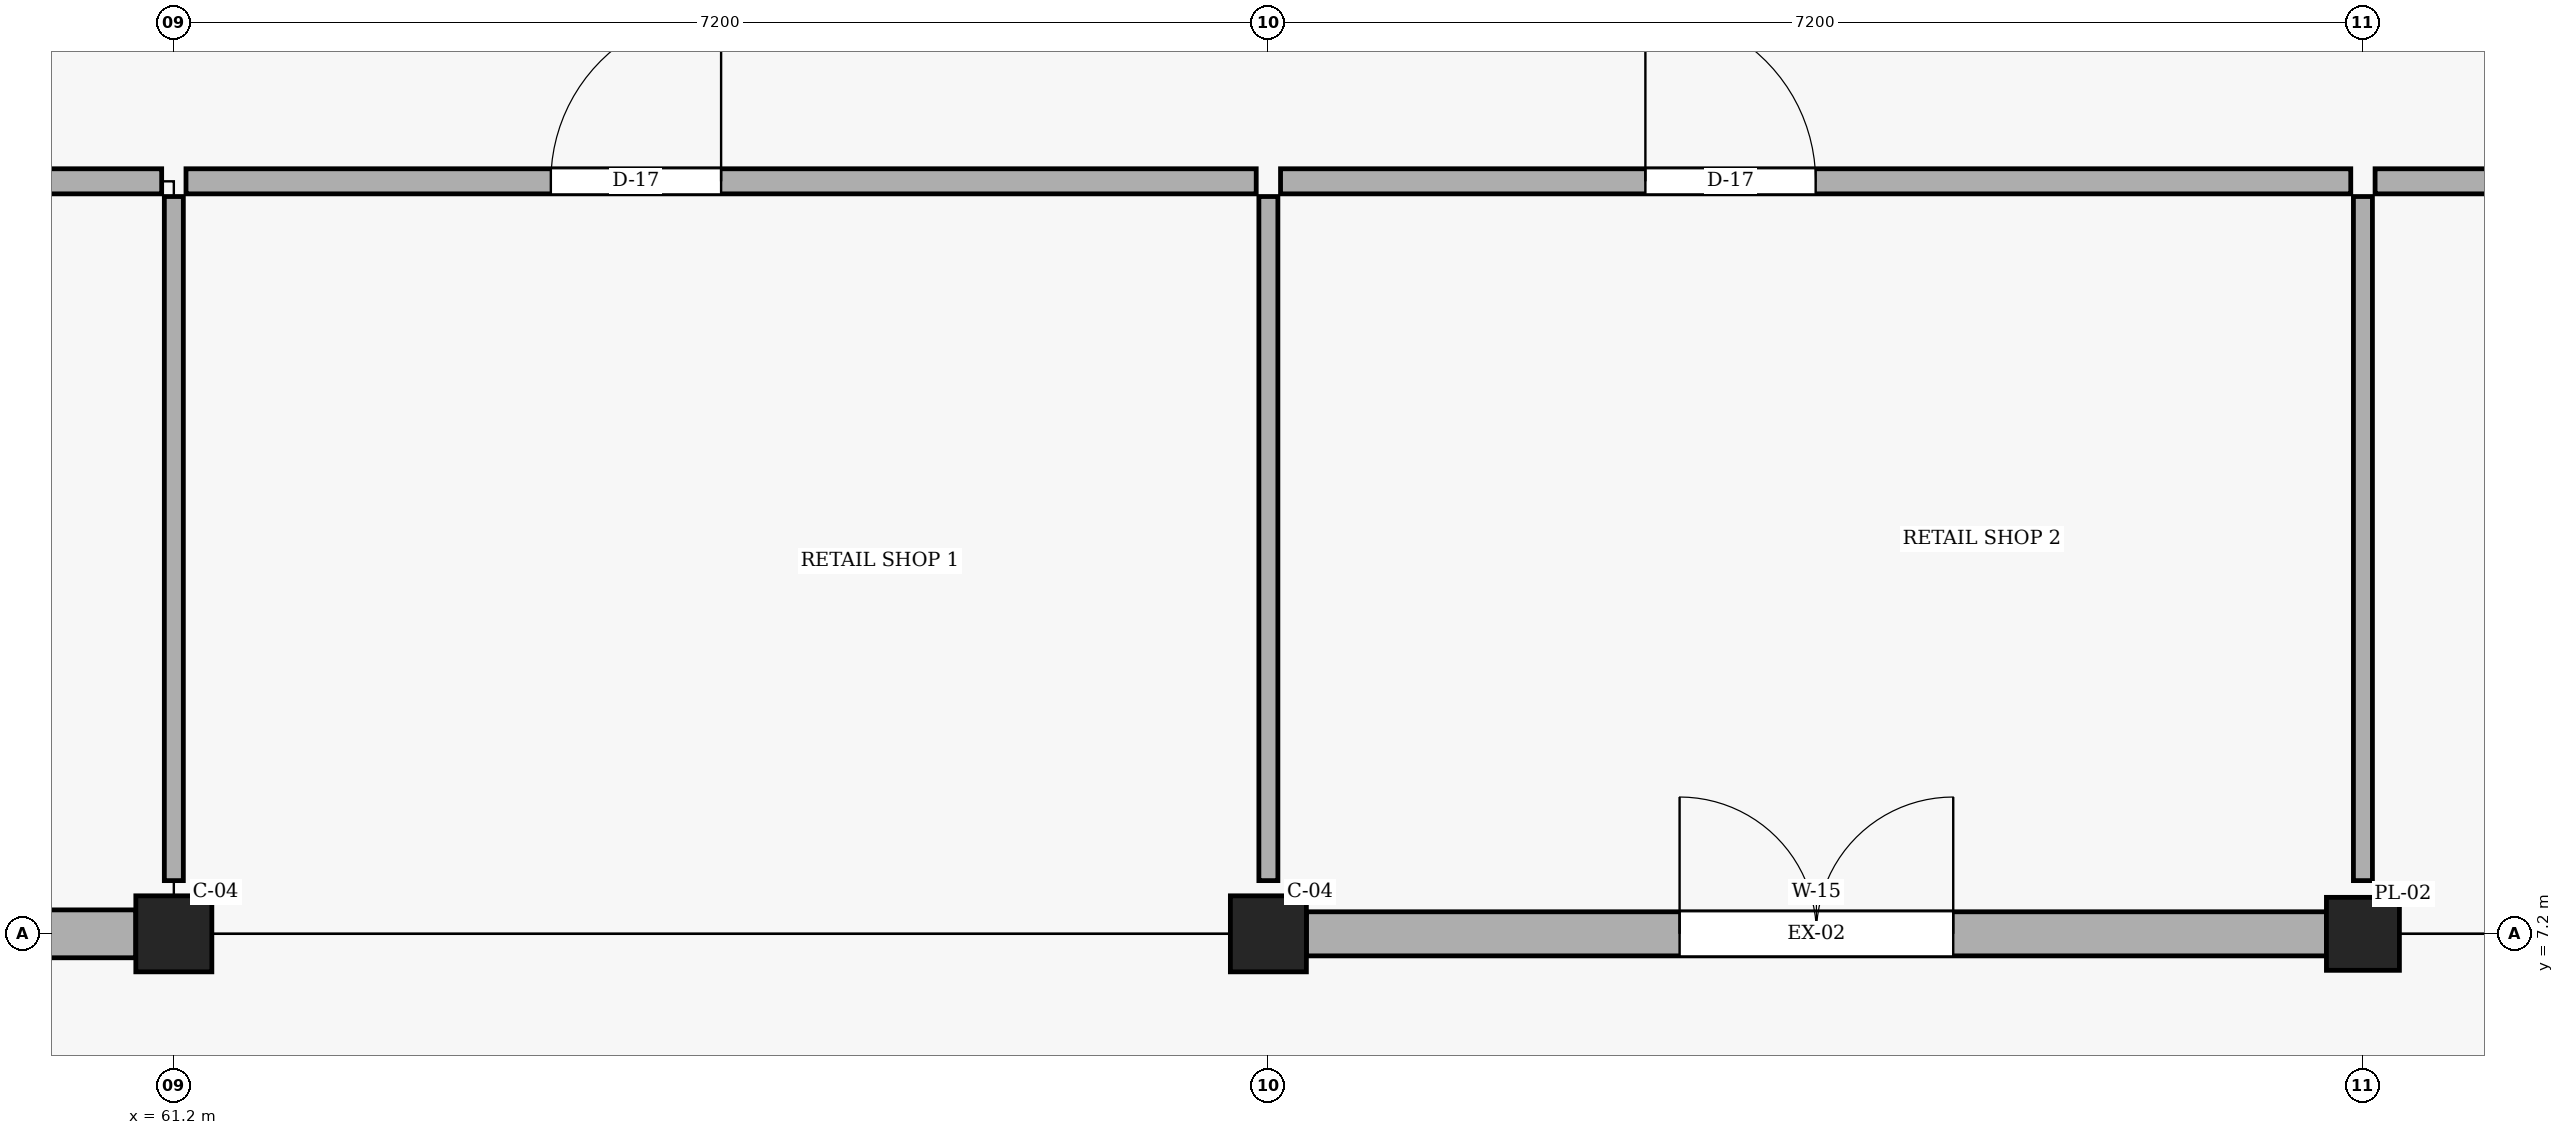
"""IFC4 building model, lengths in metres.
Left out: names, types, materials, properties, quantities, classifications, styles, units other than length and angle.
Written with IfcOpenShell. Run it as: python <this file> out.ifc"""

import sys

from ifc_helpers import new_model, si_unit, direction, frame, frame_2d, origin, origin_2d, place, context, subcontext, project, spatial, rectangle, extrude, element, fill, save


model = new_model("IFC4")
c1 = context("Model", 3, precision=1e-05, world=origin(), true_north=direction((0.0, 1.0)))
c2 = subcontext(c1, "Body", "Model", "MODEL_VIEW")
j1 = project(units=[si_unit("LENGTHUNIT", "METRE"), si_unit("PLANEANGLEUNIT", "RADIAN")], contexts=[c1])
p1 = place(None, origin())
s1 = spatial("IfcSite", under=j1, at=p1, CompositionType="ELEMENT")
p2 = place(p1, origin())
s2 = spatial("IfcBuilding", under=s1, at=p2, CompositionType="ELEMENT")
p3 = place(p2, origin())
s3 = spatial("IfcBuildingStorey", under=s2, at=p3, CompositionType="ELEMENT", Elevation=0.0)
for number, where, z_axis, x_axis in (
    (1, (61.2, 7.2, 0.0), (0.0, 0.0, 1.0), (1.0, 0.0, 0.0)),
    (2, (68.4, 7.2, 0.0), (0.0, 0.0, 1.0), (1.0, 0.0, 0.0)),
):
    element("IfcColumn", number, at=place(p3, frame(where, z_axis=z_axis, x_axis=x_axis)), inside=s3, PredefinedType="COLUMN", context=c2, shape_type="SweptSolid", body=[
        extrude(rectangle(XDim=0.5, YDim=0.5, at=origin_2d()), origin(), (0.0, 0.0, 1.0), 4.5),
    ])
p4 = place(p3, frame((75.6, 7.2, 0.0), z_axis=(0.0, 0.0, 1.0), x_axis=(1.0, 0.0, 0.0)))
e3 = element("IfcColumn", 3, at=p4, inside=s3, PredefinedType="PILASTER", context=c2, shape_type="SweptSolid", body=[
    extrude(rectangle(XDim=0.48, YDim=0.48, at=origin_2d()), origin(), (0.0, 0.0, 1.0), 4.5),
])
p5 = place(p3, frame((54.24, 7.2, 0.0), z_axis=(0.0, 0.0, 1.0), x_axis=(1.0, 0.0, 0.0)))
e4 = element("IfcWall", 4, at=p5, inside=s3, PredefinedType="SOLIDWALL", context=c2, shape_type="SweptSolid", body=[
    extrude(rectangle(XDim=6.71, YDim=0.315, at=frame_2d((3.355, 0.0))), origin(), (0.0, 0.0, 1.0), 3.83),
])
p6 = place(p5, frame((2.405, 0.0, 0.0)))
e5 = element("IfcOpeningElement", 5, at=p6, cuts=e4, PredefinedType="OPENING", context=c2, shape_type="SweptSolid", body=[
    extrude(rectangle(XDim=1.9, YDim=2.2, at=frame_2d((0.95, 1.1))), frame((0.0, 0.167, 0.0), z_axis=(0.0, -1.0, 0.0), x_axis=(1.0, 0.0, 0.0)), (0.0, 0.0, 1.0), 0.335),
])
p7 = place(p3, frame((68.65, 7.2, 0.0), z_axis=(0.0, 0.0, 1.0), x_axis=(1.0, 0.0, 0.0)))
e6 = element("IfcWall", 6, at=p7, inside=s3, PredefinedType="SOLIDWALL", context=c2, shape_type="SweptSolid", body=[
    extrude(rectangle(XDim=6.71, YDim=0.29, at=frame_2d((3.355, 0.0))), origin(), (0.0, 0.0, 1.0), 3.83),
])
p8 = place(p7, frame((2.455, 0.0, 0.0)))
e7 = element("IfcOpeningElement", 7, at=p8, cuts=e6, PredefinedType="OPENING", context=c2, shape_type="SweptSolid", body=[
    extrude(rectangle(XDim=1.8, YDim=2.2, at=frame_2d((0.9, 1.1))), frame((0.0, 0.155, 0.0), z_axis=(0.0, -1.0, 0.0), x_axis=(1.0, 0.0, 0.0)), (0.0, 0.0, 1.0), 0.31),
])
p9 = place(p3, frame((54.15, 12.15, 0.0), z_axis=(0.0, 0.0, 1.0), x_axis=(1.0, 0.0, 0.0)))
e8 = element("IfcWall", 8, at=p9, inside=s3, PredefinedType="PARTITIONING", context=c2, shape_type="SweptSolid", body=[
    extrude(rectangle(XDim=6.97, YDim=0.165, at=frame_2d((3.485, 0.0))), origin(), (0.0, 0.0, 1.0), 3.41),
])
p10 = place(p9, frame((2.4, 0.0, 0.0)))
e9 = element("IfcOpeningElement", 9, at=p10, cuts=e8, PredefinedType="OPENING", context=c2, shape_type="SweptSolid", body=[
    extrude(rectangle(XDim=1.12, YDim=2.18, at=frame_2d((0.56, 1.09))), frame((0.0, 0.093, 0.0), z_axis=(0.0, -1.0, 0.0), x_axis=(1.0, 0.0, 0.0)), (0.0, 0.0, 1.0), 0.185),
])
p11 = place(p3, frame((61.28, 12.15, 0.0), z_axis=(0.0, 0.0, 1.0), x_axis=(1.0, 0.0, 0.0)))
e10 = element("IfcWall", 10, at=p11, inside=s3, PredefinedType="PARTITIONING", context=c2, shape_type="SweptSolid", body=[
    extrude(rectangle(XDim=7.04, YDim=0.165, at=frame_2d((3.52, 0.0))), origin(), (0.0, 0.0, 1.0), 3.41),
])
p12 = place(p11, frame((2.4, 0.0, 0.0)))
e11 = element("IfcOpeningElement", 11, at=p12, cuts=e10, PredefinedType="OPENING", context=c2, shape_type="SweptSolid", body=[
    extrude(rectangle(XDim=1.12, YDim=2.18, at=frame_2d((0.56, 1.09))), frame((0.0, 0.093, 0.0), z_axis=(0.0, -1.0, 0.0), x_axis=(1.0, 0.0, 0.0)), (0.0, 0.0, 1.0), 0.185),
])
p13 = place(p3, frame((68.48, 12.15, 0.0), z_axis=(0.0, 0.0, 1.0), x_axis=(1.0, 0.0, 0.0)))
e12 = element("IfcWall", 12, at=p13, inside=s3, PredefinedType="PARTITIONING", context=c2, shape_type="SweptSolid", body=[
    extrude(rectangle(XDim=7.04, YDim=0.165, at=frame_2d((3.52, 0.0))), origin(), (0.0, 0.0, 1.0), 3.41),
])
p14 = place(p13, frame((2.4, 0.0, 0.0)))
e13 = element("IfcOpeningElement", 13, at=p14, cuts=e12, PredefinedType="OPENING", context=c2, shape_type="SweptSolid", body=[
    extrude(rectangle(XDim=1.12, YDim=2.18, at=frame_2d((0.56, 1.09))), frame((0.0, 0.093, 0.0), z_axis=(0.0, -1.0, 0.0), x_axis=(1.0, 0.0, 0.0)), (0.0, 0.0, 1.0), 0.185),
])
p15 = place(p3, frame((75.68, 12.15, 0.0), z_axis=(0.0, 0.0, 1.0), x_axis=(1.0, 0.0, 0.0)))
e14 = element("IfcWall", 14, at=p15, inside=s3, PredefinedType="PARTITIONING", context=c2, shape_type="SweptSolid", body=[
    extrude(rectangle(XDim=7.04, YDim=0.165, at=frame_2d((3.52, 0.0))), origin(), (0.0, 0.0, 1.0), 3.41),
])
p16 = place(p15, frame((2.4, 0.0, 0.0)))
e15 = element("IfcOpeningElement", 15, at=p16, cuts=e14, PredefinedType="OPENING", context=c2, shape_type="SweptSolid", body=[
    extrude(rectangle(XDim=1.12, YDim=2.18, at=frame_2d((0.56, 1.09))), frame((0.0, 0.093, 0.0), z_axis=(0.0, -1.0, 0.0), x_axis=(1.0, 0.0, 0.0)), (0.0, 0.0, 1.0), 0.185),
])
for number, where, z_axis, x_axis in (
    (16, (61.2, 7.55, 0.0), (0.0, 0.0, 1.0), (0.0, 1.0, 0.0)),
    (17, (68.4, 7.55, 0.0), (0.0, 0.0, 1.0), (0.0, 1.0, 0.0)),
    (18, (75.6, 7.55, 0.0), (0.0, 0.0, 1.0), (0.0, 1.0, 0.0)),
):
    element("IfcWall", number, at=place(p3, frame(where, z_axis=z_axis, x_axis=x_axis)), inside=s3, PredefinedType="PARTITIONING", context=c2, shape_type="SweptSolid", body=[
        extrude(rectangle(XDim=4.5, YDim=0.125, at=frame_2d((2.25, 0.0))), origin(), (0.0, 0.0, 1.0), 3.41),
    ])
p17 = place(p8, frame((1.8, 0.0, 0.0), z_axis=(0.0, 0.0, 1.0), x_axis=(-1.0, 0.0, 0.0)))
e19 = element("IfcDoor", 19, at=p17, inside=s3, OperationType="DOUBLE_DOOR_SINGLE_SWING", PredefinedType="DOOR", context=c2, shape_type="SweptSolid", body=[
    extrude(rectangle(XDim=1.8, YDim=2.2, at=frame_2d((0.9, 1.1))), frame((0.0, 0.025, 0.0), z_axis=(0.0, -1.0, 0.0), x_axis=(1.0, 0.0, 0.0)), (0.0, 0.0, 1.0), 0.05),
])
fill(e7, e19)
p18 = place(p12, origin())
e20 = element("IfcDoor", 20, at=p18, inside=s3, OperationType="SINGLE_SWING_RIGHT", PredefinedType="DOOR", context=c2, shape_type="SweptSolid", body=[
    extrude(rectangle(XDim=1.12, YDim=2.18, at=frame_2d((0.56, 1.09))), frame((0.0, 0.025, 0.0), z_axis=(0.0, -1.0, 0.0), x_axis=(1.0, 0.0, 0.0)), (0.0, 0.0, 1.0), 0.05),
])
fill(e11, e20)
p19 = place(p14, origin())
e21 = element("IfcDoor", 21, at=p19, inside=s3, OperationType="SINGLE_SWING_LEFT", PredefinedType="DOOR", context=c2, shape_type="SweptSolid", body=[
    extrude(rectangle(XDim=1.12, YDim=2.18, at=frame_2d((0.56, 1.09))), frame((0.0, 0.025, 0.0), z_axis=(0.0, -1.0, 0.0), x_axis=(1.0, 0.0, 0.0)), (0.0, 0.0, 1.0), 0.05),
])
fill(e13, e21)
save(model, sys.argv[1])
